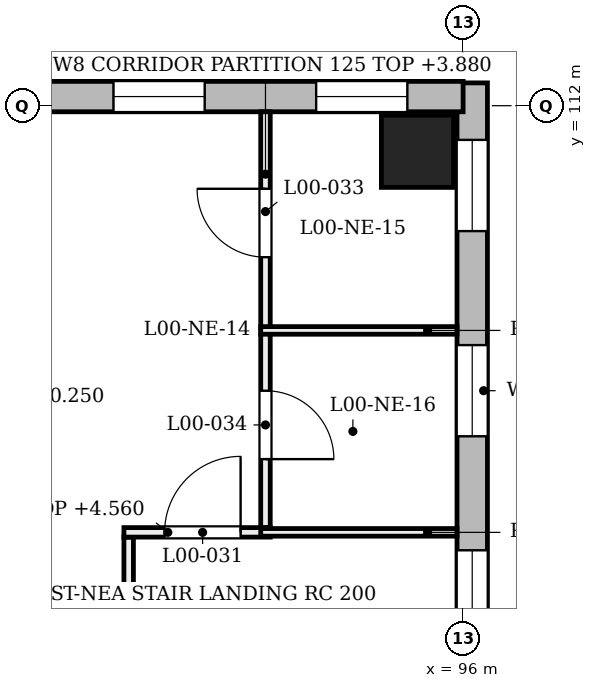
"""IFC4 building model, lengths in metres.
Left out: names, types, materials, properties, quantities, classifications, styles, units other than length and angle.
Written with IfcOpenShell. Run it as: python <this file> out.ifc"""

import sys

from ifc_helpers import new_model, si_unit, direction, frame, frame_2d, origin, origin_2d, place, context, subcontext, project, spatial, rectangle, extrude, element, fill, save


model = new_model("IFC4")
c1 = context("Model", 3, precision=1e-05, world=origin(), true_north=direction((0.0, 1.0)))
c2 = subcontext(c1, "Body", "Model", "MODEL_VIEW")
j1 = project(units=[si_unit("LENGTHUNIT", "METRE"), si_unit("PLANEANGLEUNIT", "RADIAN")], contexts=[c1])
p1 = place(None, origin())
s1 = spatial("IfcSite", under=j1, at=p1, CompositionType="ELEMENT")
p2 = place(p1, origin())
s2 = spatial("IfcBuilding", under=s1, at=p2, CompositionType="ELEMENT")
p3 = place(p2, origin())
s3 = spatial("IfcBuildingStorey", under=s2, at=p3, CompositionType="ELEMENT", Elevation=0.0)
p4 = place(p3, frame((95.4, 111.4, -1.6), z_axis=(0.0, 0.0, 1.0), x_axis=(1.0, 0.0, 0.0)))
e1 = element("IfcColumn", 1, at=p4, inside=s3, PredefinedType="COLUMN", context=c2, shape_type="SweptSolid", body=[
    extrude(rectangle(XDim=0.95, YDim=0.95, at=origin_2d()), origin(), (0.0, 0.0, 1.0), 6.4),
])
p5 = place(p3, frame((96.12, 95.725, 0.0), z_axis=(0.0, 0.0, 1.0), x_axis=(0.0, 1.0, 0.0)))
e2 = element("IfcWall", 2, at=p5, inside=s3, PredefinedType="SOLIDWALL", context=c2, shape_type="SweptSolid", body=[
    extrude(rectangle(XDim=16.575, YDim=0.4, at=frame_2d((8.288, 0.0))), origin(), (0.0, 0.0, 1.0), 3.9),
])
p6 = place(p5, frame((1.125, 0.0, 1.9)))
e3 = element("IfcOpeningElement", 3, at=p6, cuts=e2, PredefinedType="OPENING", context=c2, shape_type="SweptSolid", body=[
    extrude(rectangle(XDim=1.2, YDim=1.5, at=frame_2d((0.6, 0.75))), frame((0.0, 0.21, 0.0), z_axis=(0.0, -1.0, 0.0), x_axis=(1.0, 0.0, 0.0)), (0.0, 0.0, 1.0), 0.42),
])
p7 = place(p5, frame((3.825, 0.0, 1.9)))
e4 = element("IfcOpeningElement", 4, at=p7, cuts=e2, PredefinedType="OPENING", context=c2, shape_type="SweptSolid", body=[
    extrude(rectangle(XDim=1.2, YDim=1.5, at=frame_2d((0.6, 0.75))), frame((0.0, 0.21, 0.0), z_axis=(0.0, -1.0, 0.0), x_axis=(1.0, 0.0, 0.0)), (0.0, 0.0, 1.0), 0.42),
])
p8 = place(p5, frame((6.525, 0.0, 1.9)))
e5 = element("IfcOpeningElement", 5, at=p8, cuts=e2, PredefinedType="OPENING", context=c2, shape_type="SweptSolid", body=[
    extrude(rectangle(XDim=1.2, YDim=1.5, at=frame_2d((0.6, 0.75))), frame((0.0, 0.21, 0.0), z_axis=(0.0, -1.0, 0.0), x_axis=(1.0, 0.0, 0.0)), (0.0, 0.0, 1.0), 0.42),
])
p9 = place(p5, frame((9.225, 0.0, 1.9)))
e6 = element("IfcOpeningElement", 6, at=p9, cuts=e2, PredefinedType="OPENING", context=c2, shape_type="SweptSolid", body=[
    extrude(rectangle(XDim=1.2, YDim=1.5, at=frame_2d((0.6, 0.75))), frame((0.0, 0.21, 0.0), z_axis=(0.0, -1.0, 0.0), x_axis=(1.0, 0.0, 0.0)), (0.0, 0.0, 1.0), 0.42),
])
p10 = place(p5, frame((11.925, 0.0, 1.9)))
e7 = element("IfcOpeningElement", 7, at=p10, cuts=e2, PredefinedType="OPENING", context=c2, shape_type="SweptSolid", body=[
    extrude(rectangle(XDim=1.2, YDim=1.5, at=frame_2d((0.6, 0.75))), frame((0.0, 0.21, 0.0), z_axis=(0.0, -1.0, 0.0), x_axis=(1.0, 0.0, 0.0)), (0.0, 0.0, 1.0), 0.42),
])
p11 = place(p5, frame((14.625, 0.0, 1.9)))
e8 = element("IfcOpeningElement", 8, at=p11, cuts=e2, PredefinedType="OPENING", context=c2, shape_type="SweptSolid", body=[
    extrude(rectangle(XDim=1.2, YDim=1.5, at=frame_2d((0.6, 0.75))), frame((0.0, 0.21, 0.0), z_axis=(0.0, -1.0, 0.0), x_axis=(1.0, 0.0, 0.0)), (0.0, 0.0, 1.0), 0.42),
])
p12 = place(p3, frame((88.0, 112.12, 0.0), z_axis=(0.0, 0.0, 1.0), x_axis=(1.0, 0.0, 0.0)))
e9 = element("IfcWall", 9, at=p12, inside=s3, PredefinedType="SOLIDWALL", context=c2, shape_type="SweptSolid", body=[
    extrude(rectangle(XDim=8.0, YDim=0.4, at=frame_2d((4.0, 0.0))), origin(), (0.0, 0.0, 1.0), 3.9),
])
p13 = place(p12, frame((0.733, 0.0, 1.9)))
e10 = element("IfcOpeningElement", 10, at=p13, cuts=e9, PredefinedType="OPENING", context=c2, shape_type="SweptSolid", body=[
    extrude(rectangle(XDim=1.2, YDim=1.5, at=frame_2d((0.6, 0.75))), frame((0.0, 0.21, 0.0), z_axis=(0.0, -1.0, 0.0), x_axis=(1.0, 0.0, 0.0)), (0.0, 0.0, 1.0), 0.42),
])
p14 = place(p12, frame((3.4, 0.0, 1.9)))
e11 = element("IfcOpeningElement", 11, at=p14, cuts=e9, PredefinedType="OPENING", context=c2, shape_type="SweptSolid", body=[
    extrude(rectangle(XDim=1.2, YDim=1.5, at=frame_2d((0.6, 0.75))), frame((0.0, 0.21, 0.0), z_axis=(0.0, -1.0, 0.0), x_axis=(1.0, 0.0, 0.0)), (0.0, 0.0, 1.0), 0.42),
])
p15 = place(p12, frame((6.067, 0.0, 1.9)))
e12 = element("IfcOpeningElement", 12, at=p15, cuts=e9, PredefinedType="OPENING", context=c2, shape_type="SweptSolid", body=[
    extrude(rectangle(XDim=1.2, YDim=1.5, at=frame_2d((0.6, 0.75))), frame((0.0, 0.21, 0.0), z_axis=(0.0, -1.0, 0.0), x_axis=(1.0, 0.0, 0.0)), (0.0, 0.0, 1.0), 0.42),
])
p16 = place(p3, frame((91.6, 96.1, 0.0), z_axis=(0.0, 0.0, 1.0), x_axis=(0.0, 1.0, 0.0)))
e13 = element("IfcWall", 13, at=p16, inside=s3, PredefinedType="PARTITIONING", context=c2, shape_type="SweptSolid", body=[
    extrude(rectangle(XDim=10.223, YDim=0.125, at=frame_2d((5.112, 0.0))), origin(), (0.0, 0.0, 1.0), 3.88),
])
p17 = place(p16, frame((2.286, 0.0, 0.0)))
e14 = element("IfcOpeningElement", 14, at=p17, cuts=e13, PredefinedType="OPENING", context=c2, shape_type="SweptSolid", body=[
    extrude(rectangle(XDim=1.0, YDim=2.1, at=frame_2d((0.5, 1.05))), frame((0.0, 0.073, 0.0), z_axis=(0.0, -1.0, 0.0), x_axis=(1.0, 0.0, 0.0)), (0.0, 0.0, 1.0), 0.145),
])
p18 = place(p3, frame((93.4, 106.448, 0.0), z_axis=(0.0, 0.0, 1.0), x_axis=(0.0, 1.0, 0.0)))
e15 = element("IfcWall", 15, at=p18, inside=s3, PredefinedType="PARTITIONING", context=c2, shape_type="SweptSolid", body=[
    extrude(rectangle(XDim=5.472, YDim=0.125, at=frame_2d((2.736, 0.0))), origin(), (0.0, 0.0, 1.0), 3.88),
])
p19 = place(p18, frame((3.559, 0.0, 0.0)))
e16 = element("IfcOpeningElement", 16, at=p19, cuts=e15, PredefinedType="OPENING", context=c2, shape_type="SweptSolid", body=[
    extrude(rectangle(XDim=0.9, YDim=2.1, at=frame_2d((0.45, 1.05))), frame((0.0, 0.073, 0.0), z_axis=(0.0, -1.0, 0.0), x_axis=(1.0, 0.0, 0.0)), (0.0, 0.0, 1.0), 0.145),
])
p20 = place(p18, frame((0.901, 0.0, 0.0)))
e17 = element("IfcOpeningElement", 17, at=p20, cuts=e15, PredefinedType="OPENING", context=c2, shape_type="SweptSolid", body=[
    extrude(rectangle(XDim=0.9, YDim=2.1, at=frame_2d((0.45, 1.05))), frame((0.0, 0.073, 0.0), z_axis=(0.0, -1.0, 0.0), x_axis=(1.0, 0.0, 0.0)), (0.0, 0.0, 1.0), 0.145),
])
p21 = place(p3, frame((91.538, 106.386, 0.0), z_axis=(0.0, 0.0, 1.0), x_axis=(1.0, 0.0, 0.0)))
e18 = element("IfcWall", 18, at=p21, inside=s3, PredefinedType="PARTITIONING", context=c2, shape_type="SweptSolid", body=[
    extrude(rectangle(XDim=1.925, YDim=0.125, at=frame_2d((0.962, 0.0))), origin(), (0.0, 0.0, 1.0), 4.56),
])
p22 = place(p21, frame((0.535, 0.0, 0.0)))
e19 = element("IfcOpeningElement", 19, at=p22, cuts=e18, PredefinedType="OPENING", context=c2, shape_type="SweptSolid", body=[
    extrude(rectangle(XDim=1.0, YDim=2.1, at=frame_2d((0.5, 1.05))), frame((0.0, 0.073, 0.0), z_axis=(0.0, -1.0, 0.0), x_axis=(1.0, 0.0, 0.0)), (0.0, 0.0, 1.0), 0.145),
])
for number, where, z_axis, x_axis in (
    (20, (93.337, 106.386, 0.0), (0.0, 0.0, 1.0), (1.0, 0.0, 0.0)),
    (21, (93.337, 109.043, 0.0), (0.0, 0.0, 1.0), (1.0, 0.0, 0.0)),
):
    element("IfcWall", number, at=place(p3, frame(where, z_axis=z_axis, x_axis=x_axis)), inside=s3, PredefinedType="PARTITIONING", context=c2, shape_type="SweptSolid", body=[
        extrude(rectangle(XDim=2.583, YDim=0.1, at=frame_2d((1.291, 0.0))), origin(), (0.0, 0.0, 1.0), 3.88),
    ])
p23 = place(p9, origin())
e22 = element("IfcWindow", 22, at=p23, inside=s3, PartitioningType="SINGLE_PANEL", PredefinedType="WINDOW", context=c2, shape_type="SweptSolid", body=[
    extrude(rectangle(XDim=1.2, YDim=1.5, at=frame_2d((0.6, 0.75))), frame((0.0, 0.03, 0.0), z_axis=(0.0, -1.0, 0.0), x_axis=(1.0, 0.0, 0.0)), (0.0, 0.0, 1.0), 0.06),
])
fill(e6, e22)
p24 = place(p10, origin())
e23 = element("IfcWindow", 23, at=p24, inside=s3, PartitioningType="SINGLE_PANEL", PredefinedType="WINDOW", context=c2, shape_type="SweptSolid", body=[
    extrude(rectangle(XDim=1.2, YDim=1.5, at=frame_2d((0.6, 0.75))), frame((0.0, 0.03, 0.0), z_axis=(0.0, -1.0, 0.0), x_axis=(1.0, 0.0, 0.0)), (0.0, 0.0, 1.0), 0.06),
])
fill(e7, e23)
p25 = place(p11, origin())
e24 = element("IfcWindow", 24, at=p25, inside=s3, PartitioningType="SINGLE_PANEL", PredefinedType="WINDOW", context=c2, shape_type="SweptSolid", body=[
    extrude(rectangle(XDim=1.2, YDim=1.5, at=frame_2d((0.6, 0.75))), frame((0.0, 0.03, 0.0), z_axis=(0.0, -1.0, 0.0), x_axis=(1.0, 0.0, 0.0)), (0.0, 0.0, 1.0), 0.06),
])
fill(e8, e24)
p26 = place(p14, origin())
e25 = element("IfcWindow", 25, at=p26, inside=s3, PartitioningType="SINGLE_PANEL", PredefinedType="WINDOW", context=c2, shape_type="SweptSolid", body=[
    extrude(rectangle(XDim=1.2, YDim=1.5, at=frame_2d((0.6, 0.75))), frame((0.0, 0.03, 0.0), z_axis=(0.0, -1.0, 0.0), x_axis=(1.0, 0.0, 0.0)), (0.0, 0.0, 1.0), 0.06),
])
fill(e11, e25)
p27 = place(p15, origin())
e26 = element("IfcWindow", 26, at=p27, inside=s3, PartitioningType="SINGLE_PANEL", PredefinedType="WINDOW", context=c2, shape_type="SweptSolid", body=[
    extrude(rectangle(XDim=1.2, YDim=1.5, at=frame_2d((0.6, 0.75))), frame((0.0, 0.03, 0.0), z_axis=(0.0, -1.0, 0.0), x_axis=(1.0, 0.0, 0.0)), (0.0, 0.0, 1.0), 0.06),
])
fill(e12, e26)
p28 = place(p22, frame((1.0, 0.0, 0.0), z_axis=(0.0, 0.0, 1.0), x_axis=(-1.0, 0.0, 0.0)))
e27 = element("IfcDoor", 27, at=p28, inside=s3, OperationType="SINGLE_SWING_RIGHT", PredefinedType="DOOR", context=c2, shape_type="SweptSolid", body=[
    extrude(rectangle(XDim=1.0, YDim=2.1, at=frame_2d((0.5, 1.05))), frame((0.0, 0.025, 0.0), z_axis=(0.0, -1.0, 0.0), x_axis=(1.0, 0.0, 0.0)), (0.0, 0.0, 1.0), 0.05),
])
fill(e19, e27)
p29 = place(p19, frame((0.9, 0.0, 0.0), z_axis=(0.0, 0.0, 1.0), x_axis=(-1.0, 0.0, 0.0)))
e28 = element("IfcDoor", 28, at=p29, inside=s3, OperationType="SINGLE_SWING_RIGHT", PredefinedType="DOOR", context=c2, shape_type="SweptSolid", body=[
    extrude(rectangle(XDim=0.9, YDim=2.1, at=frame_2d((0.45, 1.05))), frame((0.0, 0.025, 0.0), z_axis=(0.0, -1.0, 0.0), x_axis=(1.0, 0.0, 0.0)), (0.0, 0.0, 1.0), 0.05),
])
fill(e16, e28)
p30 = place(p20, frame((0.9, 0.0, 0.0), z_axis=(0.0, 0.0, 1.0), x_axis=(-1.0, 0.0, 0.0)))
e29 = element("IfcDoor", 29, at=p30, inside=s3, OperationType="SINGLE_SWING_LEFT", PredefinedType="DOOR", context=c2, shape_type="SweptSolid", body=[
    extrude(rectangle(XDim=0.9, YDim=2.1, at=frame_2d((0.45, 1.05))), frame((0.0, 0.025, 0.0), z_axis=(0.0, -1.0, 0.0), x_axis=(1.0, 0.0, 0.0)), (0.0, 0.0, 1.0), 0.05),
])
fill(e17, e29)
save(model, sys.argv[1])
